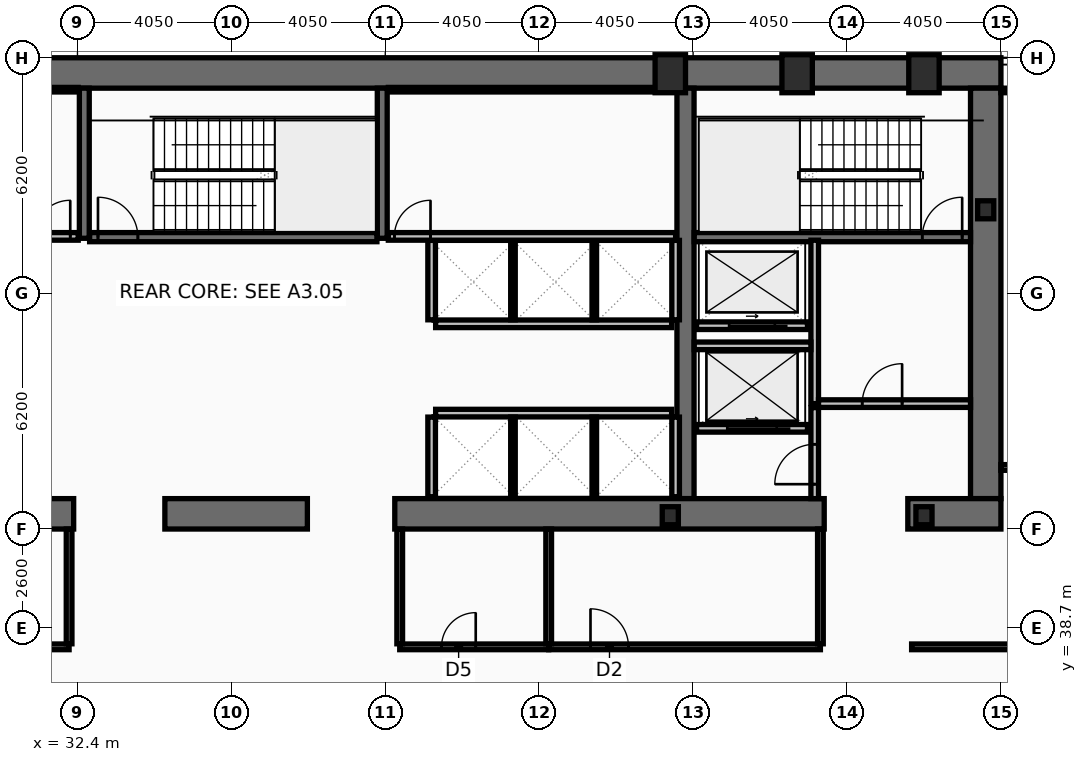
"""IFC4 building model, lengths in metres.
Left out: names, types, materials, properties, quantities, classifications, styles, units other than length and angle.
Written with IfcOpenShell. Run it as: python <this file> out.ifc"""

import sys

from ifc_helpers import new_model, si_unit, direction, frame, frame_2d, origin, origin_2d, place, context, subcontext, project, spatial, rectangle, hollow_rectangle, i_section, extrude, element, fill, save


model = new_model("IFC4")
c1 = context("Model", 3, precision=1e-05, world=origin(), true_north=direction((0.0, 1.0)))
c2 = subcontext(c1, "Body", "Model", "MODEL_VIEW")
j1 = project(units=[si_unit("LENGTHUNIT", "METRE"), si_unit("PLANEANGLEUNIT", "RADIAN")], contexts=[c1])
p1 = place(None, origin())
s1 = spatial("IfcSite", under=j1, at=p1, CompositionType="ELEMENT")
p2 = place(p1, origin())
s2 = spatial("IfcBuilding", under=s1, at=p2, CompositionType="ELEMENT")
p3 = place(p2, frame((0.0, 0.0, 25.8)))
s3 = spatial("IfcBuildingStorey", under=s2, at=p3, CompositionType="ELEMENT", Elevation=25.8)
p4 = place(p3, frame((16.2, 53.3, 0.0), z_axis=(0.0, 0.0, 1.0), x_axis=(1.0, 0.0, 0.0)))
e1 = element("IfcWall", 1, at=p4, inside=s3, PredefinedType="SHEAR", context=c2, shape_type="SweptSolid", body=[
    extrude(rectangle(XDim=40.5, YDim=0.8, at=frame_2d((20.25, 0.0))), origin(), (0.0, 0.0, 1.0), 3.82),
])
p5 = place(p3, frame((56.3, 52.9, 0.0), z_axis=(0.0, 0.0, 1.0), x_axis=(0.0, -1.0, 0.0)))
e2 = element("IfcWall", 2, at=p5, inside=s3, PredefinedType="SHEAR", context=c2, shape_type="SweptSolid", body=[
    extrude(rectangle(XDim=10.8, YDim=0.8, at=frame_2d((5.4, 0.0))), origin(), (0.0, 0.0, 1.0), 3.82),
])
p6 = place(p3, frame((48.4, 42.1, 0.0), z_axis=(0.0, 0.0, 1.0), x_axis=(0.0, 1.0, 0.0)))
e3 = element("IfcWall", 3, at=p6, inside=s3, PredefinedType="SHEAR", context=c2, shape_type="SweptSolid", body=[
    extrude(rectangle(XDim=10.8, YDim=0.45, at=frame_2d((5.4, 0.0))), origin(), (0.0, 0.0, 1.0), 3.82),
])
p7 = place(p3, frame((32.3, 41.7, 0.0), z_axis=(0.0, 0.0, 1.0), x_axis=(-1.0, 0.0, 0.0)))
e4 = element("IfcWall", 4, at=p7, inside=s3, PredefinedType="SHEAR", context=c2, shape_type="SweptSolid", body=[
    extrude(rectangle(XDim=11.45, YDim=0.8, at=frame_2d((5.725, 0.0))), origin(), (0.0, 0.0, 1.0), 3.82),
])
p8 = place(p3, frame((38.45, 41.7, 0.0), z_axis=(0.0, 0.0, 1.0), x_axis=(-1.0, 0.0, 0.0)))
e5 = element("IfcWall", 5, at=p8, inside=s3, PredefinedType="SHEAR", context=c2, shape_type="SweptSolid", body=[
    extrude(rectangle(XDim=3.75, YDim=0.8, at=frame_2d((1.875, 0.0))), origin(), (0.0, 0.0, 1.0), 3.82),
])
p9 = place(p3, frame((52.05, 41.7, 0.0), z_axis=(0.0, 0.0, 1.0), x_axis=(-1.0, 0.0, 0.0)))
e6 = element("IfcWall", 6, at=p9, inside=s3, PredefinedType="SHEAR", context=c2, shape_type="SweptSolid", body=[
    extrude(rectangle(XDim=11.3, YDim=0.8, at=frame_2d((5.65, 0.0))), origin(), (0.0, 0.0, 1.0), 3.82),
])
p10 = place(p3, frame((56.7, 41.7, 0.0), z_axis=(0.0, 0.0, 1.0), x_axis=(-1.0, 0.0, 0.0)))
e7 = element("IfcWall", 7, at=p10, inside=s3, PredefinedType="SHEAR", context=c2, shape_type="SweptSolid", body=[
    extrude(rectangle(XDim=2.45, YDim=0.8, at=frame_2d((1.225, 0.0))), origin(), (0.0, 0.0, 1.0), 3.82),
])
for number, where, z_axis, x_axis in (
    (8, (32.58, 48.95, 0.0), (0.0, 0.0, 1.0), (0.0, 1.0, 0.0)),
    (9, (40.42, 48.95, 0.0), (0.0, 0.0, 1.0), (0.0, 1.0, 0.0)),
):
    element("IfcWall", number, at=place(p3, frame(where, z_axis=z_axis, x_axis=x_axis)), inside=s3, PredefinedType="SHEAR", context=c2, shape_type="SweptSolid", body=[
        extrude(rectangle(XDim=3.95, YDim=0.26, at=frame_2d((1.975, 0.0))), origin(), (0.0, 0.0, 1.0), 3.82),
    ])
p11 = place(p3, frame((48.63, 48.98, 0.0), z_axis=(0.0, 0.0, 1.0), x_axis=(1.0, 0.0, 0.0)))
e10 = element("IfcWall", 10, at=p11, inside=s3, PredefinedType="SHEAR", context=c2, shape_type="SweptSolid", body=[
    extrude(rectangle(XDim=7.27, YDim=0.24, at=frame_2d((3.635, 0.0))), origin(), (0.0, 0.0, 1.0), 3.82),
])
p12 = place(p11, frame((6.0, 0.0, 0.0)))
e11 = element("IfcOpeningElement", 11, at=p12, cuts=e10, PredefinedType="OPENING", context=c2, shape_type="SweptSolid", body=[
    extrude(rectangle(XDim=1.05, YDim=2.15, at=frame_2d((0.525, 1.075))), frame((0.0, 0.13, 0.0), z_axis=(0.0, -1.0, 0.0), x_axis=(1.0, 0.0, 0.0)), (0.0, 0.0, 1.0), 0.26),
])
p13 = place(p3, frame((32.72, 48.98, 0.0), z_axis=(0.0, 0.0, 1.0), x_axis=(1.0, 0.0, 0.0)))
e12 = element("IfcWall", 12, at=p13, inside=s3, PredefinedType="SHEAR", context=c2, shape_type="SweptSolid", body=[
    extrude(rectangle(XDim=7.56, YDim=0.24, at=frame_2d((3.78, 0.0))), origin(), (0.0, 0.0, 1.0), 3.82),
])
p14 = place(p13, frame((0.22, 0.0, 0.0)))
e13 = element("IfcOpeningElement", 13, at=p14, cuts=e12, PredefinedType="OPENING", context=c2, shape_type="SweptSolid", body=[
    extrude(rectangle(XDim=1.05, YDim=2.15, at=frame_2d((0.525, 1.075))), frame((0.0, 0.13, 0.0), z_axis=(0.0, -1.0, 0.0), x_axis=(1.0, 0.0, 0.0)), (0.0, 0.0, 1.0), 0.26),
])
for number, where, z_axis, x_axis in (
    (14, (48.0, 53.28, 0.0), (0.0, 0.0, 1.0), (1.0, 0.0, 0.0)),
    (15, (51.337, 53.28, 0.0), (0.0, 0.0, 1.0), (1.0, 0.0, 0.0)),
    (16, (54.675, 53.28, 0.0), (0.0, 0.0, 1.0), (1.0, 0.0, 0.0)),
):
    element("IfcColumn", number, at=place(p3, frame(where, z_axis=z_axis, x_axis=x_axis)), inside=s3, PredefinedType="COLUMN", context=c2, shape_type="SweptSolid", body=[
        extrude(hollow_rectangle(XDim=0.8, YDim=1.0, WallThickness=0.055, at=origin_2d()), origin(), (0.0, 0.0, 1.0), 4.0),
    ])
for number, where, z_axis, x_axis in (
    (17, (56.3, 49.7, 0.0), (0.0, 0.0, 1.0), (1.0, 0.0, 0.0)),
    (18, (48.0, 41.65, 0.0), (0.0, 0.0, 1.0), (1.0, 0.0, 0.0)),
    (19, (54.675, 41.65, 0.0), (0.0, 0.0, 1.0), (1.0, 0.0, 0.0)),
):
    element("IfcColumn", number, at=place(p3, frame(where, z_axis=z_axis, x_axis=x_axis)), inside=s3, PredefinedType="COLUMN", context=c2, shape_type="SweptSolid", body=[
        extrude(i_section(OverallWidth=0.424, OverallDepth=0.474, WebThickness=0.048, FlangeThickness=0.077, at=origin_2d()), origin(), (0.0, 0.0, 1.0), 4.0),
    ])
p15 = place(p3, frame((51.61, 43.95, 0.0), z_axis=(0.0, 0.0, 1.0), x_axis=(-1.0, 0.0, 0.0)))
e20 = element("IfcWall", 20, at=p15, inside=s3, PredefinedType="PARTITIONING", context=c2, shape_type="SweptSolid", body=[
    extrude(rectangle(XDim=2.92, YDim=0.2, at=frame_2d((1.46, 0.0))), origin(), (0.0, 0.0, 1.0), 3.82),
])
p16 = place(p15, frame((0.81, 0.0, 0.0)))
e21 = element("IfcOpeningElement", 21, at=p16, cuts=e20, PredefinedType="OPENING", context=c2, shape_type="SweptSolid", body=[
    extrude(rectangle(XDim=1.3, YDim=2.18, at=frame_2d((0.65, 1.09))), frame((0.0, 0.11, 0.0), z_axis=(0.0, -1.0, 0.0), x_axis=(1.0, 0.0, 0.0)), (0.0, 0.0, 1.0), 0.22),
])
p17 = place(p3, frame((51.61, 46.65, 0.0), z_axis=(0.0, 0.0, 1.0), x_axis=(-1.0, 0.0, 0.0)))
e22 = element("IfcWall", 22, at=p17, inside=s3, PredefinedType="PARTITIONING", context=c2, shape_type="SweptSolid", body=[
    extrude(rectangle(XDim=2.92, YDim=0.2, at=frame_2d((1.46, 0.0))), origin(), (0.0, 0.0, 1.0), 3.82),
])
p18 = place(p17, frame((0.86, 0.0, 0.0)))
e23 = element("IfcOpeningElement", 23, at=p18, cuts=e22, PredefinedType="OPENING", context=c2, shape_type="SweptSolid", body=[
    extrude(rectangle(XDim=1.2, YDim=2.18, at=frame_2d((0.6, 1.09))), frame((0.0, 0.11, 0.0), z_axis=(0.0, -1.0, 0.0), x_axis=(1.0, 0.0, 0.0)), (0.0, 0.0, 1.0), 0.22),
])
p19 = place(p3, frame((51.8, 44.6, 0.0), z_axis=(0.0, 0.0, 1.0), x_axis=(0.0, 1.0, 0.0)))
e24 = element("IfcWall", 24, at=p19, inside=s3, PredefinedType="PARTITIONING", context=c2, shape_type="SweptSolid", body=[
    extrude(rectangle(XDim=4.3, YDim=0.2, at=frame_2d((2.15, 0.0))), origin(), (0.0, 0.0, 1.0), 3.82),
])
p20 = place(p3, frame((51.9, 44.6, 0.0), z_axis=(0.0, 0.0, 1.0), x_axis=(1.0, 0.0, 0.0)))
e25 = element("IfcWall", 25, at=p20, inside=s3, PredefinedType="PARTITIONING", context=c2, shape_type="SweptSolid", body=[
    extrude(rectangle(XDim=4.0, YDim=0.2, at=frame_2d((2.0, 0.0))), origin(), (0.0, 0.0, 1.0), 3.82),
])
p21 = place(p20, frame((1.15, 0.0, 0.0)))
e26 = element("IfcOpeningElement", 26, at=p21, cuts=e25, PredefinedType="OPENING", context=c2, shape_type="SweptSolid", body=[
    extrude(rectangle(XDim=1.05, YDim=2.15, at=frame_2d((0.525, 1.075))), frame((0.0, 0.11, 0.0), z_axis=(0.0, -1.0, 0.0), x_axis=(1.0, 0.0, 0.0)), (0.0, 0.0, 1.0), 0.22),
])
p22 = place(p3, frame((48.63, 46.12, 0.0), z_axis=(0.0, 0.0, 1.0), x_axis=(1.0, 0.0, 0.0)))
e27 = element("IfcWall", 27, at=p22, inside=s3, PredefinedType="PARTITIONING", context=c2, shape_type="SweptSolid", body=[
    extrude(rectangle(XDim=3.07, YDim=0.2, at=frame_2d((1.535, 0.0))), origin(), (0.0, 0.0, 1.0), 3.82),
])
p23 = place(p3, frame((51.8, 42.1, 0.0), z_axis=(0.0, 0.0, 1.0), x_axis=(0.0, 1.0, 0.0)))
e28 = element("IfcWall", 28, at=p23, inside=s3, PredefinedType="PARTITIONING", context=c2, shape_type="SweptSolid", body=[
    extrude(rectangle(XDim=2.395, YDim=0.2, at=frame_2d((1.198, 0.0))), origin(), (0.0, 0.0, 1.0), 3.82),
])
p24 = place(p23, frame((0.38, 0.0, 0.0)))
e29 = element("IfcOpeningElement", 29, at=p24, cuts=e28, PredefinedType="OPENING", context=c2, shape_type="SweptSolid", body=[
    extrude(rectangle(XDim=1.05, YDim=2.15, at=frame_2d((0.525, 1.075))), frame((0.0, 0.11, 0.0), z_axis=(0.0, -1.0, 0.0), x_axis=(1.0, 0.0, 0.0)), (0.0, 0.0, 1.0), 0.22),
])
p25 = place(p3, frame((41.825, 46.7, 0.0), z_axis=(0.0, 0.0, 1.0), x_axis=(1.0, 0.0, 0.0)))
e30 = element("IfcWall", 30, at=p25, inside=s3, PredefinedType="PARTITIONING", context=c2, shape_type="SweptSolid", body=[
    extrude(rectangle(XDim=6.21, YDim=0.2, at=frame_2d((3.105, 0.0))), origin(), (0.0, 0.0, 1.0), 3.82),
])
for number, where, z_axis, x_axis in (
    (31, (41.72, 46.805, 0.0), (0.0, 0.0, 1.0), (0.0, 1.0, 0.0)),
    (32, (48.14, 46.805, 0.0), (0.0, 0.0, 1.0), (0.0, 1.0, 0.0)),
):
    element("IfcWall", number, at=place(p3, frame(where, z_axis=z_axis, x_axis=x_axis)), inside=s3, PredefinedType="PARTITIONING", context=c2, shape_type="SweptSolid", body=[
        extrude(rectangle(XDim=2.09, YDim=0.2, at=frame_2d((1.045, 0.0))), origin(), (0.0, 0.0, 1.0), 3.82),
    ])
for number, where, z_axis, x_axis in (
    (33, (43.86, 46.805, 0.0), (0.0, 0.0, 1.0), (0.0, 1.0, 0.0)),
    (34, (46.0, 46.805, 0.0), (0.0, 0.0, 1.0), (0.0, 1.0, 0.0)),
):
    element("IfcWall", number, at=place(p3, frame(where, z_axis=z_axis, x_axis=x_axis)), inside=s3, PredefinedType="PARTITIONING", context=c2, shape_type="SweptSolid", body=[
        extrude(rectangle(XDim=2.09, YDim=0.12, at=frame_2d((1.045, 0.0))), origin(), (0.0, 0.0, 1.0), 3.82),
    ])
p26 = place(p3, frame((41.825, 44.35, 0.0), z_axis=(0.0, 0.0, 1.0), x_axis=(1.0, 0.0, 0.0)))
e35 = element("IfcWall", 35, at=p26, inside=s3, PredefinedType="PARTITIONING", context=c2, shape_type="SweptSolid", body=[
    extrude(rectangle(XDim=6.21, YDim=0.2, at=frame_2d((3.105, 0.0))), origin(), (0.0, 0.0, 1.0), 3.82),
])
for number, where, z_axis, x_axis in (
    (36, (41.72, 42.15, 0.0), (0.0, 0.0, 1.0), (0.0, 1.0, 0.0)),
    (37, (48.14, 42.15, 0.0), (0.0, 0.0, 1.0), (0.0, 1.0, 0.0)),
):
    element("IfcWall", number, at=place(p3, frame(where, z_axis=z_axis, x_axis=x_axis)), inside=s3, PredefinedType="PARTITIONING", context=c2, shape_type="SweptSolid", body=[
        extrude(rectangle(XDim=2.095, YDim=0.2, at=frame_2d((1.048, 0.0))), origin(), (0.0, 0.0, 1.0), 3.82),
    ])
for number, where, z_axis, x_axis in (
    (38, (43.86, 42.15, 0.0), (0.0, 0.0, 1.0), (0.0, 1.0, 0.0)),
    (39, (46.0, 42.15, 0.0), (0.0, 0.0, 1.0), (0.0, 1.0, 0.0)),
):
    element("IfcWall", number, at=place(p3, frame(where, z_axis=z_axis, x_axis=x_axis)), inside=s3, PredefinedType="PARTITIONING", context=c2, shape_type="SweptSolid", body=[
        extrude(rectangle(XDim=2.095, YDim=0.12, at=frame_2d((1.048, 0.0))), origin(), (0.0, 0.0, 1.0), 3.82),
    ])
p27 = place(p3, frame((24.7, 52.86, 0.0), z_axis=(0.0, 0.0, 1.0), x_axis=(1.0, 0.0, 0.0)))
e40 = element("IfcWall", 40, at=p27, inside=s3, PredefinedType="PARTITIONING", context=c2, shape_type="SweptSolid", body=[
    extrude(rectangle(XDim=7.72, YDim=0.12, at=frame_2d((3.86, 0.0))), origin(), (0.0, 0.0, 1.0), 3.82),
])
p28 = place(p3, frame((24.7, 49.0, 0.0), z_axis=(0.0, 0.0, 1.0), x_axis=(1.0, 0.0, 0.0)))
e41 = element("IfcWall", 41, at=p28, inside=s3, PredefinedType="PARTITIONING", context=c2, shape_type="SweptSolid", body=[
    extrude(rectangle(XDim=7.72, YDim=0.2, at=frame_2d((3.86, 0.0))), origin(), (0.0, 0.0, 1.0), 3.82),
])
p29 = place(p28, frame((6.56, 0.0, 0.0)))
e42 = element("IfcOpeningElement", 42, at=p29, cuts=e41, PredefinedType="OPENING", context=c2, shape_type="SweptSolid", body=[
    extrude(rectangle(XDim=0.95, YDim=2.1, at=frame_2d((0.475, 1.05))), frame((0.0, 0.11, 0.0), z_axis=(0.0, -1.0, 0.0), x_axis=(1.0, 0.0, 0.0)), (0.0, 0.0, 1.0), 0.22),
])
p30 = place(p3, frame((40.58, 52.86, 0.0), z_axis=(0.0, 0.0, 1.0), x_axis=(1.0, 0.0, 0.0)))
e43 = element("IfcWall", 43, at=p30, inside=s3, PredefinedType="PARTITIONING", context=c2, shape_type="SweptSolid", body=[
    extrude(rectangle(XDim=7.56, YDim=0.12, at=frame_2d((3.78, 0.0))), origin(), (0.0, 0.0, 1.0), 3.82),
])
p31 = place(p3, frame((40.58, 49.0, 0.0), z_axis=(0.0, 0.0, 1.0), x_axis=(1.0, 0.0, 0.0)))
e44 = element("IfcWall", 44, at=p31, inside=s3, PredefinedType="PARTITIONING", context=c2, shape_type="SweptSolid", body=[
    extrude(rectangle(XDim=7.56, YDim=0.2, at=frame_2d((3.78, 0.0))), origin(), (0.0, 0.0, 1.0), 3.82),
])
p32 = place(p31, frame((0.16, 0.0, 0.0)))
e45 = element("IfcOpeningElement", 45, at=p32, cuts=e44, PredefinedType="OPENING", context=c2, shape_type="SweptSolid", body=[
    extrude(rectangle(XDim=0.95, YDim=2.1, at=frame_2d((0.475, 1.05))), frame((0.0, 0.11, 0.0), z_axis=(0.0, -1.0, 0.0), x_axis=(1.0, 0.0, 0.0)), (0.0, 0.0, 1.0), 0.22),
])
p33 = place(p3, frame((28.4, 38.2, 0.0), z_axis=(0.0, 0.0, 1.0), x_axis=(1.0, 0.0, 0.0)))
e46 = element("IfcWall", 46, at=p33, inside=s3, PredefinedType="PARTITIONING", context=c2, shape_type="SweptSolid", body=[
    extrude(rectangle(XDim=3.78, YDim=0.15, at=frame_2d((1.89, 0.0))), origin(), (0.0, 0.0, 1.0), 3.01),
])
p34 = place(p33, frame((0.7, 0.0, 0.0)))
e47 = element("IfcOpeningElement", 47, at=p34, cuts=e46, PredefinedType="OPENING", context=c2, shape_type="SweptSolid", body=[
    extrude(rectangle(XDim=0.95, YDim=2.05, at=frame_2d((0.475, 1.025))), frame((0.0, 0.085, 0.0), z_axis=(0.0, -1.0, 0.0), x_axis=(1.0, 0.0, 0.0)), (0.0, 0.0, 1.0), 0.17),
])
p35 = place(p3, frame((32.18, 38.28, 0.0), z_axis=(0.0, 0.0, 1.0), x_axis=(0.0, 1.0, 0.0)))
e48 = element("IfcWall", 48, at=p35, inside=s3, PredefinedType="PARTITIONING", context=c2, shape_type="SweptSolid", body=[
    extrude(rectangle(XDim=3.02, YDim=0.15, at=frame_2d((1.51, 0.0))), origin(), (0.0, 0.0, 1.0), 3.82),
])
p36 = place(p3, frame((40.88, 38.2, 0.0), z_axis=(0.0, 0.0, 1.0), x_axis=(1.0, 0.0, 0.0)))
e49 = element("IfcWall", 49, at=p36, inside=s3, PredefinedType="PARTITIONING", context=c2, shape_type="SweptSolid", body=[
    extrude(rectangle(XDim=3.92, YDim=0.15, at=frame_2d((1.96, 0.0))), origin(), (0.0, 0.0, 1.0), 3.01),
])
p37 = place(p36, frame((1.1, 0.0, 0.0)))
e50 = element("IfcOpeningElement", 50, at=p37, cuts=e49, PredefinedType="OPENING", context=c2, shape_type="SweptSolid", body=[
    extrude(rectangle(XDim=0.9, YDim=2.05, at=frame_2d((0.45, 1.025))), frame((0.0, 0.085, 0.0), z_axis=(0.0, -1.0, 0.0), x_axis=(1.0, 0.0, 0.0)), (0.0, 0.0, 1.0), 0.17),
])
p38 = place(p3, frame((44.8, 38.2, 0.0), z_axis=(0.0, 0.0, 1.0), x_axis=(1.0, 0.0, 0.0)))
e51 = element("IfcWall", 51, at=p38, inside=s3, PredefinedType="PARTITIONING", context=c2, shape_type="SweptSolid", body=[
    extrude(rectangle(XDim=7.15, YDim=0.15, at=frame_2d((3.575, 0.0))), origin(), (0.0, 0.0, 1.0), 3.01),
])
p39 = place(p38, frame((1.1, 0.0, 0.0)))
e52 = element("IfcOpeningElement", 52, at=p39, cuts=e51, PredefinedType="OPENING", context=c2, shape_type="SweptSolid", body=[
    extrude(rectangle(XDim=1.0, YDim=2.05, at=frame_2d((0.5, 1.025))), frame((0.0, 0.085, 0.0), z_axis=(0.0, -1.0, 0.0), x_axis=(1.0, 0.0, 0.0)), (0.0, 0.0, 1.0), 0.17),
])
for number, where, z_axis, x_axis in (
    (53, (40.88, 38.28, 0.0), (0.0, 0.0, 1.0), (0.0, 1.0, 0.0)),
    (54, (44.8, 38.28, 0.0), (0.0, 0.0, 1.0), (0.0, 1.0, 0.0)),
    (55, (51.95, 38.28, 0.0), (0.0, 0.0, 1.0), (0.0, 1.0, 0.0)),
):
    element("IfcWall", number, at=place(p3, frame(where, z_axis=z_axis, x_axis=x_axis)), inside=s3, PredefinedType="PARTITIONING", context=c2, shape_type="SweptSolid", body=[
        extrude(rectangle(XDim=3.02, YDim=0.15, at=frame_2d((1.51, 0.0))), origin(), (0.0, 0.0, 1.0), 3.82),
    ])
p40 = place(p3, frame((54.35, 38.2, 0.0), z_axis=(0.0, 0.0, 1.0), x_axis=(1.0, 0.0, 0.0)))
e56 = element("IfcWall", 56, at=p40, inside=s3, PredefinedType="PARTITIONING", context=c2, shape_type="SweptSolid", body=[
    extrude(rectangle(XDim=16.52, YDim=0.15, at=frame_2d((8.26, 0.0))), origin(), (0.0, 0.0, 1.0), 3.01),
])
p41 = place(p40, frame((3.25, 0.0, 0.0)))
e57 = element("IfcOpeningElement", 57, at=p41, cuts=e56, PredefinedType="OPENING", context=c2, shape_type="SweptSolid", body=[
    extrude(rectangle(XDim=0.95, YDim=2.05, at=frame_2d((0.475, 1.025))), frame((0.0, 0.085, 0.0), z_axis=(0.0, -1.0, 0.0), x_axis=(1.0, 0.0, 0.0)), (0.0, 0.0, 1.0), 0.17),
])
p42 = place(p3, frame((56.7, 42.92, 0.0), z_axis=(0.0, 0.0, 1.0), x_axis=(1.0, 0.0, 0.0)))
e58 = element("IfcWall", 58, at=p42, inside=s3, PredefinedType="PARTITIONING", context=c2, shape_type="SweptSolid", body=[
    extrude(rectangle(XDim=14.105, YDim=0.15, at=frame_2d((7.052, 0.0))), origin(), (0.0, 0.0, 1.0), 3.01),
])
p43 = place(p42, frame((0.9, 0.0, 0.0)))
e59 = element("IfcOpeningElement", 59, at=p43, cuts=e58, PredefinedType="OPENING", context=c2, shape_type="SweptSolid", body=[
    extrude(rectangle(XDim=0.9, YDim=2.05, at=frame_2d((0.45, 1.025))), frame((0.0, 0.085, 0.0), z_axis=(0.0, -1.0, 0.0), x_axis=(1.0, 0.0, 0.0)), (0.0, 0.0, 1.0), 0.17),
])
p44 = place(p3, frame((56.7, 52.84, 0.0), z_axis=(0.0, 0.0, 1.0), x_axis=(1.0, 0.0, 0.0)))
e60 = element("IfcWall", 60, at=p44, inside=s3, PredefinedType="PARTITIONING", context=c2, shape_type="SweptSolid", body=[
    extrude(rectangle(XDim=14.105, YDim=0.12, at=frame_2d((7.052, 0.0))), origin(), (0.0, 0.0, 1.0), 3.82),
])
p45 = place(p12, origin())
e61 = element("IfcDoor", 61, at=p45, inside=s3, OperationType="SINGLE_SWING_RIGHT", PredefinedType="DOOR", context=c2, shape_type="SweptSolid", body=[
    extrude(rectangle(XDim=1.05, YDim=2.15, at=frame_2d((0.525, 1.075))), frame((0.0, 0.025, 0.0), z_axis=(0.0, -1.0, 0.0), x_axis=(1.0, 0.0, 0.0)), (0.0, 0.0, 1.0), 0.05),
])
fill(e11, e61)
p46 = place(p14, origin())
e62 = element("IfcDoor", 62, at=p46, inside=s3, OperationType="SINGLE_SWING_LEFT", PredefinedType="DOOR", context=c2, shape_type="SweptSolid", body=[
    extrude(rectangle(XDim=1.05, YDim=2.15, at=frame_2d((0.525, 1.075))), frame((0.0, 0.025, 0.0), z_axis=(0.0, -1.0, 0.0), x_axis=(1.0, 0.0, 0.0)), (0.0, 0.0, 1.0), 0.05),
])
fill(e13, e62)
p47 = place(p16, origin())
e63 = element("IfcDoor", 63, at=p47, inside=s3, OperationType="SLIDING_TO_LEFT", PredefinedType="DOOR", context=c2, shape_type="SweptSolid", body=[
    extrude(rectangle(XDim=1.3, YDim=2.18, at=frame_2d((0.65, 1.09))), frame((0.0, 0.025, 0.0), z_axis=(0.0, -1.0, 0.0), x_axis=(1.0, 0.0, 0.0)), (0.0, 0.0, 1.0), 0.05),
])
fill(e21, e63)
p48 = place(p18, origin())
e64 = element("IfcDoor", 64, at=p48, inside=s3, OperationType="SLIDING_TO_LEFT", PredefinedType="DOOR", context=c2, shape_type="SweptSolid", body=[
    extrude(rectangle(XDim=1.2, YDim=2.18, at=frame_2d((0.6, 1.09))), frame((0.0, 0.025, 0.0), z_axis=(0.0, -1.0, 0.0), x_axis=(1.0, 0.0, 0.0)), (0.0, 0.0, 1.0), 0.05),
])
fill(e23, e64)
p49 = place(p21, origin())
e65 = element("IfcDoor", 65, at=p49, inside=s3, OperationType="SINGLE_SWING_RIGHT", PredefinedType="DOOR", context=c2, shape_type="SweptSolid", body=[
    extrude(rectangle(XDim=1.05, YDim=2.15, at=frame_2d((0.525, 1.075))), frame((0.0, 0.025, 0.0), z_axis=(0.0, -1.0, 0.0), x_axis=(1.0, 0.0, 0.0)), (0.0, 0.0, 1.0), 0.05),
])
fill(e26, e65)
p50 = place(p24, origin())
e66 = element("IfcDoor", 66, at=p50, inside=s3, OperationType="SINGLE_SWING_LEFT", PredefinedType="DOOR", context=c2, shape_type="SweptSolid", body=[
    extrude(rectangle(XDim=1.05, YDim=2.15, at=frame_2d((0.525, 1.075))), frame((0.0, 0.025, 0.0), z_axis=(0.0, -1.0, 0.0), x_axis=(1.0, 0.0, 0.0)), (0.0, 0.0, 1.0), 0.05),
])
fill(e29, e66)
p51 = place(p29, origin())
e67 = element("IfcDoor", 67, at=p51, inside=s3, OperationType="SINGLE_SWING_RIGHT", PredefinedType="DOOR", context=c2, shape_type="SweptSolid", body=[
    extrude(rectangle(XDim=0.95, YDim=2.1, at=frame_2d((0.475, 1.05))), frame((0.0, 0.025, 0.0), z_axis=(0.0, -1.0, 0.0), x_axis=(1.0, 0.0, 0.0)), (0.0, 0.0, 1.0), 0.05),
])
fill(e42, e67)
p52 = place(p32, origin())
e68 = element("IfcDoor", 68, at=p52, inside=s3, OperationType="SINGLE_SWING_RIGHT", PredefinedType="DOOR", context=c2, shape_type="SweptSolid", body=[
    extrude(rectangle(XDim=0.95, YDim=2.1, at=frame_2d((0.475, 1.05))), frame((0.0, 0.025, 0.0), z_axis=(0.0, -1.0, 0.0), x_axis=(1.0, 0.0, 0.0)), (0.0, 0.0, 1.0), 0.05),
])
fill(e45, e68)
p53 = place(p37, origin())
e69 = element("IfcDoor", 69, at=p53, inside=s3, OperationType="SINGLE_SWING_RIGHT", PredefinedType="DOOR", context=c2, shape_type="SweptSolid", body=[
    extrude(rectangle(XDim=0.9, YDim=2.05, at=frame_2d((0.45, 1.025))), frame((0.0, 0.025, 0.0), z_axis=(0.0, -1.0, 0.0), x_axis=(1.0, 0.0, 0.0)), (0.0, 0.0, 1.0), 0.05),
])
fill(e50, e69)
p54 = place(p39, origin())
e70 = element("IfcDoor", 70, at=p54, inside=s3, OperationType="SINGLE_SWING_LEFT", PredefinedType="DOOR", context=c2, shape_type="SweptSolid", body=[
    extrude(rectangle(XDim=1.0, YDim=2.05, at=frame_2d((0.5, 1.025))), frame((0.0, 0.025, 0.0), z_axis=(0.0, -1.0, 0.0), x_axis=(1.0, 0.0, 0.0)), (0.0, 0.0, 1.0), 0.05),
])
fill(e52, e70)
save(model, sys.argv[1])
